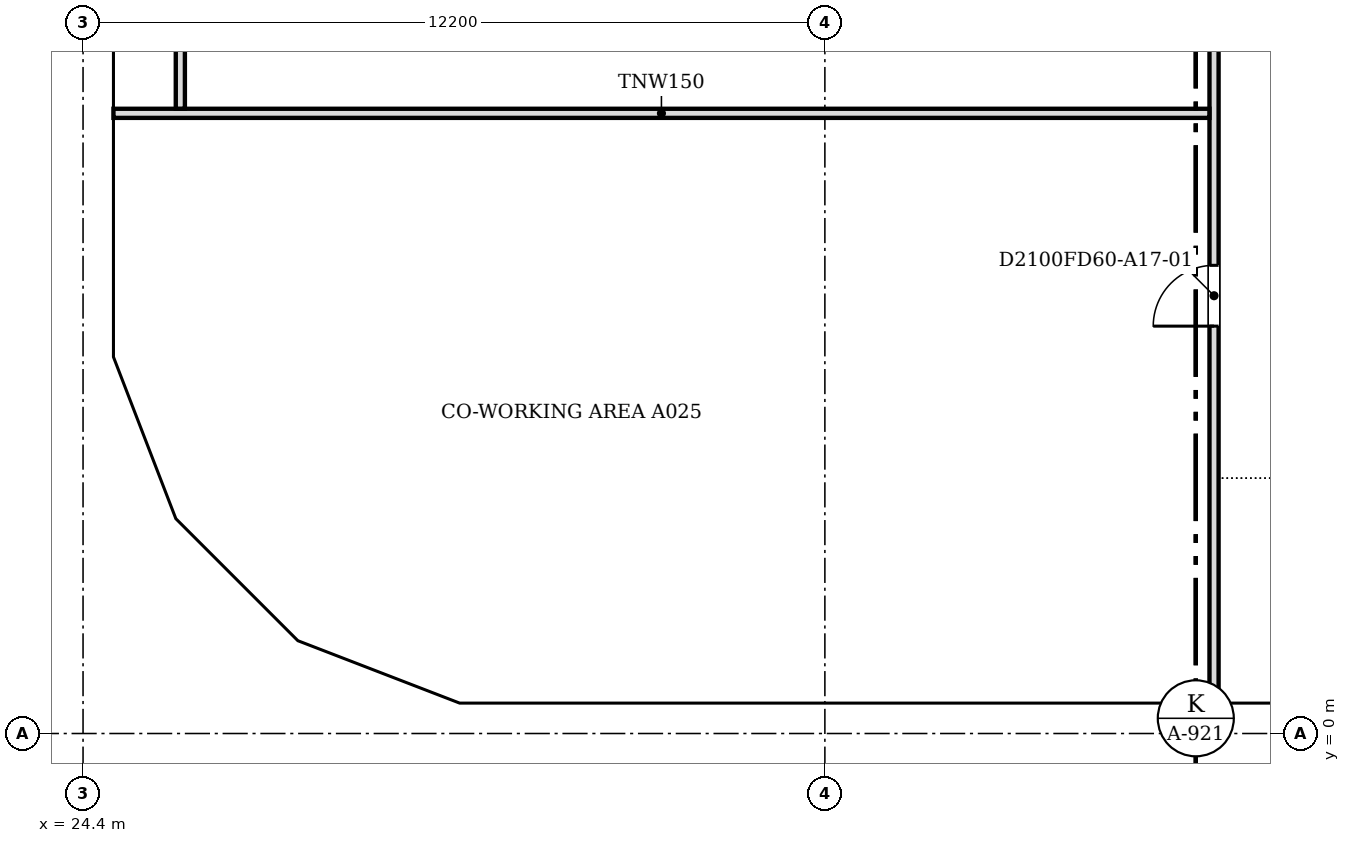
"""IFC4 building model, lengths in metres.
Left out: names, types, materials, properties, quantities, classifications, styles, units other than length and angle.
Written with IfcOpenShell. Run it as: python <this file> out.ifc"""

import sys

from ifc_helpers import new_model, si_unit, direction, frame, frame_2d, origin, place, context, subcontext, project, spatial, polyline, rectangle, outline, extrude, faceted_brep, source, transform, mapped, element, fill, save


model = new_model("IFC4")
c1 = context("Model", 3, precision=1e-05, world=origin(), true_north=direction((0.0, 1.0)))
c2 = subcontext(c1, "Body", "Model", "MODEL_VIEW")
j1 = project(units=[si_unit("LENGTHUNIT", "METRE"), si_unit("PLANEANGLEUNIT", "RADIAN")], contexts=[c1])
p1 = place(None, origin())
s1 = spatial("IfcSite", under=j1, at=p1, CompositionType="ELEMENT")
p2 = place(p1, origin())
s2 = spatial("IfcBuilding", under=s1, at=p2, CompositionType="ELEMENT")
p3 = place(p2, frame((0.0, 0.0, 185.8)))
s3 = spatial("IfcBuildingStorey", under=s2, at=p3, CompositionType="ELEMENT", Elevation=185.8)
m1 = source(origin(), c2, "Body", "Brep", [
    faceted_brep([(0.047, -0.25, 0.0), (3.05, -0.25, 3.8), (0.047, -0.25, 7.6), (0.0, -0.25, 7.54), (0.0, -0.25, 0.06), (0.093, 0.25, 7.541), (3.05, 0.25, 3.8), (0.093, 0.25, 0.059), (0.047, 0.0, 0.0), (0.047, 0.0, 7.6)], [[[0, 1, 2, 3, 4]], [[5, 6, 7]], [[7, 6, 1, 0, 8]], [[6, 5, 9, 2, 1]], [[3, 2, 9]], [[8, 0, 4]], [[7, 8, 4, 3, 9, 5]]]),
])
p4 = place(p3, frame((30.5, 0.25, -3.8), z_axis=(0.0, 0.0, 1.0), x_axis=(1.0, 0.0, 0.0)))
e1 = element("IfcWall", 1, at=p4, inside=s3, PredefinedType="SOLIDWALL", context=c2, shape_type="MappedRepresentation", body=[
    mapped(m1, transform((0.0, 0.0, 0.0), scale=1.0)),
])
m2 = source(origin(), c2, "Body", "SweptSolid", [
    extrude(outline(polyline([(0.247, 0.656), (2.731, 3.8), (0.247, 6.944), (0.247, 0.656)])), frame((0.0, 0.26, 0.0), z_axis=(0.0, -1.0, 0.0), x_axis=(1.0, 0.0, 0.0)), (0.0, 0.0, 1.0), 0.52),
])
p5 = place(p4, origin())
e2 = element("IfcOpeningElement", 2, at=p5, cuts=e1, PredefinedType="OPENING", context=c2, shape_type="MappedRepresentation", body=[
    mapped(m2, transform((0.0, 0.0, 0.0), scale=1.0)),
])
m3 = source(origin(), c2, "Body", "Brep", [
    faceted_brep([(2.95, -0.25, 0.0), (2.997, -0.25, 0.059), (2.997, -0.25, 7.541), (2.95, -0.25, 7.6), (0.0, -0.25, 3.8), (0.053, 0.25, 3.868), (2.904, 0.25, 7.54), (2.904, 0.25, 0.06), (0.053, 0.25, 3.732), (2.95, 0.0, 0.0), (2.95, 0.0, 7.6), (0.0, 0.0, 3.8)], [[[0, 1, 2, 3, 4]], [[5, 6, 7, 8]], [[1, 0, 9]], [[10, 3, 2]], [[6, 5, 11, 4, 3, 10]], [[8, 7, 9, 0, 4, 11]], [[8, 11, 5]], [[1, 9, 7, 6, 10, 2]]]),
])
p6 = place(p3, frame((27.794, 1.312, -3.8), z_axis=(0.0, 0.0, 1.0), x_axis=(0.932973525033, -0.359944998003, 0.0)))
e3 = element("IfcWall", 3, at=p6, inside=s3, PredefinedType="SOLIDWALL", context=c2, shape_type="MappedRepresentation", body=[
    mapped(m3, transform((0.0, 0.0, 0.0), scale=1.0)),
])
m4 = source(origin(), c2, "Body", "SweptSolid", [
    extrude(outline(polyline([(2.75, 6.935), (0.316, 3.8), (2.75, 0.665), (2.75, 6.935)])), frame((0.0, 0.26, 0.0), z_axis=(0.0, -1.0, 0.0), x_axis=(1.0, 0.0, 0.0)), (0.0, 0.0, 1.0), 0.52),
])
p7 = place(p6, origin())
e4 = element("IfcOpeningElement", 4, at=p7, cuts=e3, PredefinedType="OPENING", context=c2, shape_type="MappedRepresentation", body=[
    mapped(m4, transform((0.0, 0.0, 0.0), scale=1.0)),
])
m5 = source(origin(), c2, "Body", "Brep", [
    faceted_brep([(3.05, -0.25, 0.0), (6.1, -0.25, 3.8), (6.1, -0.25, 3.8), (3.05, -0.25, 7.6), (0.0, -0.25, 3.8), (0.0, 0.25, 3.8), (3.05, 0.25, 7.6), (6.1, 0.25, 3.8), (6.1, 0.25, 3.8), (3.05, 0.25, 0.0)], [[[0, 1, 2, 3, 4]], [[5, 6, 7, 8, 9]], [[9, 8, 1, 0]], [[7, 6, 3, 2]], [[6, 5, 4, 3]], [[5, 9, 0, 4]], [[1, 8, 7, 2]]]),
])
p8 = place(p3, frame((33.55, 0.25, -3.8), z_axis=(0.0, 0.0, 1.0), x_axis=(1.0, 0.0, 0.0)))
e5 = element("IfcWall", 5, at=p8, inside=s3, PredefinedType="SOLIDWALL", context=c2, shape_type="MappedRepresentation", body=[
    mapped(m5, transform((0.0, 0.0, 0.0), scale=1.0)),
])
m6 = source(origin(), c2, "Body", "SweptSolid", [
    extrude(outline(polyline([(3.05, 0.399), (5.78, 3.8), (3.05, 7.201), (0.321, 3.8), (3.05, 0.399)])), frame((0.0, 0.26, 0.0), z_axis=(0.0, -1.0, 0.0), x_axis=(1.0, 0.0, 0.0)), (0.0, 0.0, 1.0), 0.52),
])
p9 = place(p8, origin())
e6 = element("IfcOpeningElement", 6, at=p9, cuts=e5, PredefinedType="OPENING", context=c2, shape_type="MappedRepresentation", body=[
    mapped(m6, transform((0.0, 0.0, 0.0), scale=1.0)),
])
m7 = source(origin(), c2, "Body", "SweptSolid", [
    extrude(outline(polyline([(3.05, 0.0), (6.1, 3.8), (3.05, 7.6), (0.0, 3.8), (3.05, 0.0)])), frame((0.0, 0.25, 0.0), z_axis=(0.0, -1.0, 0.0), x_axis=(1.0, 0.0, 0.0)), (0.0, 0.0, 1.0), 0.5),
])
p10 = place(p3, frame((39.65, 0.25, -3.8), z_axis=(0.0, 0.0, 1.0), x_axis=(1.0, 0.0, 0.0)))
e7 = element("IfcWall", 7, at=p10, inside=s3, PredefinedType="SOLIDWALL", context=c2, shape_type="MappedRepresentation", body=[
    mapped(m7, transform((0.0, 0.0, 0.0), scale=1.0)),
])
p11 = place(p10, origin())
e8 = element("IfcOpeningElement", 8, at=p11, cuts=e7, PredefinedType="OPENING", context=c2, shape_type="MappedRepresentation", body=[
    mapped(m6, transform((0.0, 0.0, 0.0), scale=1.0)),
])
m8 = source(origin(), c2, "Body", "Brep", [
    faceted_brep([(3.096, -0.25, 0.0), (6.1, -0.25, 3.8), (3.096, -0.25, 7.6), (0.047, -0.25, 3.857), (0.047, -0.25, 3.743), (0.0, 0.25, 3.8), (3.096, 0.25, 7.6), (6.053, 0.25, 3.859), (6.053, 0.25, 3.741), (3.096, 0.25, 0.0), (6.1, -0.0, 3.8), (0.0, 0.0, 3.8)], [[[0, 1, 2, 3, 4]], [[5, 6, 7, 8, 9]], [[9, 8, 10, 1, 0]], [[7, 6, 2, 1, 10]], [[6, 5, 11, 3, 2]], [[5, 9, 0, 4, 11]], [[11, 4, 3]], [[10, 8, 7]]]),
])
p12 = place(p3, frame((24.65, 12.247, -3.8), z_axis=(0.0, 0.0, 1.0), x_axis=(0.0, -1.0, 0.0)))
e9 = element("IfcWall", 9, at=p12, inside=s3, PredefinedType="SOLIDWALL", context=c2, shape_type="MappedRepresentation", body=[
    mapped(m8, transform((0.0, 0.0, 0.0), scale=1.0)),
])
m9 = source(origin(), c2, "Body", "SweptSolid", [
    extrude(outline(polyline([(3.094, 0.399), (5.781, 3.8), (3.094, 7.201), (0.323, 3.8), (3.094, 0.399)])), frame((0.0, 0.26, 0.0), z_axis=(0.0, -1.0, 0.0), x_axis=(1.0, 0.0, 0.0)), (0.0, 0.0, 1.0), 0.52),
])
p13 = place(p12, origin())
e10 = element("IfcOpeningElement", 10, at=p13, cuts=e9, PredefinedType="OPENING", context=c2, shape_type="MappedRepresentation", body=[
    mapped(m9, transform((0.0, 0.0, 0.0), scale=1.0)),
])
m10 = source(origin(), c2, "Body", "Brep", [
    faceted_brep([(2.95, -0.25, 0.0), (3.003, -0.25, 0.068), (3.003, -0.25, 7.532), (2.95, -0.25, 7.6), (0.0, -0.25, 3.8), (0.047, 0.25, 3.86), (2.898, 0.25, 7.532), (2.898, 0.25, 0.068), (0.047, 0.25, 3.74), (2.95, 0.0, 0.0), (2.95, 0.0, 7.6), (0.0, 0.0, 3.8)], [[[0, 1, 2, 3, 4]], [[5, 6, 7, 8]], [[1, 0, 9]], [[10, 3, 2]], [[6, 5, 11, 4, 3, 10]], [[8, 7, 9, 0, 4, 11]], [[8, 11, 5]], [[1, 9, 7, 6, 10, 2]]]),
])
p14 = place(p3, frame((24.65, 6.146, -3.8), z_axis=(0.0, 0.0, 1.0), x_axis=(0.359953949349, -0.932970071518, 0.0)))
e11 = element("IfcWall", 11, at=p14, inside=s3, PredefinedType="SOLIDWALL", context=c2, shape_type="MappedRepresentation", body=[
    mapped(m10, transform((0.0, 0.0, 0.0), scale=1.0)),
])
p15 = place(p14, origin())
e12 = element("IfcOpeningElement", 12, at=p15, cuts=e11, PredefinedType="OPENING", context=c2, shape_type="MappedRepresentation", body=[
    mapped(m4, transform((0.0, 0.0, 0.0), scale=1.0)),
])
m11 = source(origin(), c2, "Body", "Brep", [
    faceted_brep([(0.053, -0.25, 0.0), (2.997, -0.25, 3.8), (0.053, -0.25, 7.6), (0.0, -0.25, 7.532), (0.0, -0.25, 0.068), (0.106, 0.25, 7.532), (2.944, 0.25, 3.868), (2.944, 0.25, 3.732), (0.106, 0.25, 0.068), (2.997, 0.0, 3.8), (0.053, 0.0, 0.0), (0.053, 0.0, 7.6)], [[[0, 1, 2, 3, 4]], [[5, 6, 7, 8]], [[8, 7, 9, 1, 0, 10]], [[6, 5, 11, 2, 1, 9]], [[3, 2, 11]], [[10, 0, 4]], [[8, 10, 4, 3, 11, 5]], [[9, 7, 6]]]),
])
p16 = place(p3, frame((25.675, 3.431, -3.8), z_axis=(0.0, 0.0, 1.0), x_axis=(0.707106781187, -0.707106781187, 0.0)))
e13 = element("IfcWall", 13, at=p16, inside=s3, PredefinedType="SOLIDWALL", context=c2, shape_type="MappedRepresentation", body=[
    mapped(m11, transform((0.0, 0.0, 0.0), scale=1.0)),
])
m12 = source(origin(), c2, "Body", "SweptSolid", [
    extrude(outline(polyline([(0.253, 0.666), (2.681, 3.8), (0.253, 6.934), (0.253, 0.666)])), frame((0.0, 0.26, 0.0), z_axis=(0.0, -1.0, 0.0), x_axis=(1.0, 0.0, 0.0)), (0.0, 0.0, 1.0), 0.52),
])
p17 = place(p16, origin())
e14 = element("IfcOpeningElement", 14, at=p17, cuts=e13, PredefinedType="OPENING", context=c2, shape_type="MappedRepresentation", body=[
    mapped(m12, transform((0.0, 0.0, 0.0), scale=1.0)),
])
p18 = place(p2, frame((0.0, 0.0, 189.6)))
s4 = spatial("IfcBuildingStorey", under=s2, at=p18, CompositionType="ELEMENT", Elevation=189.6)
m13 = source(origin(), c2, "Body", "Brep", [
    faceted_brep([(3.003, -0.25, 0.0), (6.053, -0.25, 3.8), (3.003, -0.25, 7.6), (0.0, -0.25, 3.8), (0.047, 0.25, 3.859), (3.003, 0.25, 7.6), (6.053, 0.25, 3.8), (3.003, 0.25, 0.0), (0.047, 0.25, 3.741), (0.0, 0.0, 3.8)], [[[0, 1, 2, 3]], [[4, 5, 6, 7, 8]], [[7, 6, 1, 0]], [[6, 5, 2, 1]], [[5, 4, 9, 3, 2]], [[8, 7, 0, 3, 9]], [[8, 9, 4]]]),
])
p19 = place(p18, frame((30.547, 0.25, -3.8), z_axis=(0.0, 0.0, 1.0), x_axis=(1.0, 0.0, 0.0)))
e15 = element("IfcWall", 15, at=p19, inside=s4, PredefinedType="SOLIDWALL", context=c2, shape_type="MappedRepresentation", body=[
    mapped(m13, transform((0.0, 0.0, 0.0), scale=1.0)),
])
m14 = source(origin(), c2, "Body", "SweptSolid", [
    extrude(outline(polyline([(3.005, 0.401), (5.733, 3.8), (3.005, 7.199), (0.319, 3.8), (3.005, 0.401)])), frame((0.0, 0.26, 0.0), z_axis=(0.0, -1.0, 0.0), x_axis=(1.0, 0.0, 0.0)), (0.0, 0.0, 1.0), 0.52),
])
p20 = place(p19, origin())
e16 = element("IfcOpeningElement", 16, at=p20, cuts=e15, PredefinedType="OPENING", context=c2, shape_type="MappedRepresentation", body=[
    mapped(m14, transform((0.0, 0.0, 0.0), scale=1.0)),
])
m15 = source(origin(), c2, "Body", "Brep", [
    faceted_brep([(3.05, -0.25, 0.0), (6.1, -0.25, 3.8), (6.1, -0.25, 3.8), (3.05, -0.25, 7.6), (0.0, -0.25, 3.8), (0.0, 0.25, 3.8), (3.05, 0.25, 7.6), (6.1, 0.25, 3.8), (6.1, 0.25, 3.8), (3.05, 0.25, 0.0)], [[[0, 1, 2, 3, 4]], [[5, 6, 7, 8, 9]], [[9, 8, 1, 0]], [[7, 6, 3, 2]], [[6, 5, 4, 3]], [[5, 9, 0, 4]], [[1, 8, 7, 2]]]),
])
p21 = place(p18, frame((36.6, 0.25, -3.8), z_axis=(0.0, 0.0, 1.0), x_axis=(1.0, 0.0, 0.0)))
e17 = element("IfcWall", 17, at=p21, inside=s4, PredefinedType="SOLIDWALL", context=c2, shape_type="MappedRepresentation", body=[
    mapped(m15, transform((0.0, 0.0, 0.0), scale=1.0)),
])
m16 = source(origin(), c2, "Body", "SweptSolid", [
    extrude(outline(polyline([(3.05, 0.399), (5.78, 3.8), (3.05, 7.2), (0.321, 3.8), (3.05, 0.399)])), frame((0.0, 0.26, 0.0), z_axis=(0.0, -1.0, 0.0), x_axis=(1.0, 0.0, 0.0)), (0.0, 0.0, 1.0), 0.52),
])
p22 = place(p21, origin())
e18 = element("IfcOpeningElement", 18, at=p22, cuts=e17, PredefinedType="OPENING", context=c2, shape_type="MappedRepresentation", body=[
    mapped(m16, transform((0.0, 0.0, 0.0), scale=1.0)),
])
m17 = source(origin(), c2, "Body", "SweptSolid", [
    extrude(outline(polyline([(3.05, 0.0), (6.1, 3.8), (3.05, 7.6), (0.0, 3.8), (3.05, 0.0)])), frame((0.0, 0.25, 0.0), z_axis=(0.0, -1.0, 0.0), x_axis=(1.0, 0.0, 0.0)), (0.0, 0.0, 1.0), 0.5),
])
p23 = place(p18, frame((42.7, 0.25, -3.8), z_axis=(0.0, 0.0, 1.0), x_axis=(1.0, 0.0, 0.0)))
e19 = element("IfcWall", 19, at=p23, inside=s4, PredefinedType="SOLIDWALL", context=c2, shape_type="MappedRepresentation", body=[
    mapped(m17, transform((0.0, 0.0, 0.0), scale=1.0)),
])
p24 = place(p23, origin())
e20 = element("IfcOpeningElement", 20, at=p24, cuts=e19, PredefinedType="OPENING", context=c2, shape_type="MappedRepresentation", body=[
    mapped(m16, transform((0.0, 0.0, 0.0), scale=1.0)),
])
m18 = source(origin(), c2, "Body", "Brep", [
    faceted_brep([(0.093, -0.25, 0.057), (3.143, -0.25, 3.8), (0.093, -0.25, 7.543), (0.0, 0.25, 7.544), (0.047, 0.25, 7.6), (3.143, 0.25, 3.8), (0.047, 0.25, 0.0), (0.0, 0.25, 0.056), (0.047, 0.0, 0.0), (0.047, 0.0, 7.6)], [[[0, 1, 2]], [[3, 4, 5, 6, 7]], [[6, 5, 1, 0, 8]], [[5, 4, 9, 2, 1]], [[4, 3, 9]], [[7, 6, 8]], [[7, 8, 0, 2, 9, 3]]]),
])
p25 = place(p18, frame((24.65, 12.293, -3.8), z_axis=(0.0, 0.0, 1.0), x_axis=(0.0, -1.0, 0.0)))
e21 = element("IfcWall", 21, at=p25, inside=s4, PredefinedType="SOLIDWALL", context=c2, shape_type="MappedRepresentation", body=[
    mapped(m18, transform((0.0, 0.0, 0.0), scale=1.0)),
])
m19 = source(origin(), c2, "Body", "SweptSolid", [
    extrude(outline(polyline([(0.247, 0.641), (2.821, 3.8), (0.247, 6.959), (0.247, 0.641)])), frame((0.0, 0.26, 0.0), z_axis=(0.0, -1.0, 0.0), x_axis=(1.0, 0.0, 0.0)), (0.0, 0.0, 1.0), 0.52),
])
p26 = place(p25, origin())
e22 = element("IfcOpeningElement", 22, at=p26, cuts=e21, PredefinedType="OPENING", context=c2, shape_type="MappedRepresentation", body=[
    mapped(m19, transform((0.0, 0.0, 0.0), scale=1.0)),
])
m20 = source(origin(), c2, "Body", "Brep", [
    faceted_brep([(3.003, -0.25, 0.0), (3.05, -0.25, 0.06), (3.05, -0.25, 7.54), (3.003, -0.25, 7.6), (0.0, -0.25, 3.8), (0.0, 0.25, 3.8), (2.957, 0.25, 7.541), (2.957, 0.25, 0.059), (3.003, 0.0, 0.0), (3.003, 0.0, 7.6)], [[[0, 1, 2, 3, 4]], [[5, 6, 7]], [[1, 0, 8]], [[9, 3, 2]], [[6, 5, 4, 3, 9]], [[5, 7, 8, 0, 4]], [[1, 8, 7, 6, 9, 2]]]),
])
p27 = place(p18, frame((24.65, 9.15, -3.8), z_axis=(0.0, 0.0, 1.0), x_axis=(0.0, -1.0, 0.0)))
e23 = element("IfcWall", 23, at=p27, inside=s4, PredefinedType="SOLIDWALL", context=c2, shape_type="MappedRepresentation", body=[
    mapped(m20, transform((0.0, 0.0, 0.0), scale=1.0)),
])
m21 = source(origin(), c2, "Body", "SweptSolid", [
    extrude(outline(polyline([(2.803, 6.944), (0.319, 3.8), (2.803, 0.656), (2.803, 6.944)])), frame((0.0, 0.26, 0.0), z_axis=(0.0, -1.0, 0.0), x_axis=(1.0, 0.0, 0.0)), (0.0, 0.0, 1.0), 0.52),
])
p28 = place(p27, origin())
e24 = element("IfcOpeningElement", 24, at=p28, cuts=e23, PredefinedType="OPENING", context=c2, shape_type="MappedRepresentation", body=[
    mapped(m21, transform((0.0, 0.0, 0.0), scale=1.0)),
])
m22 = source(origin(), c2, "Body", "Brep", [
    faceted_brep([(0.047, -0.25, 0.0), (2.997, -0.25, 3.8), (0.047, -0.25, 7.6), (0.0, -0.25, 7.541), (0.0, -0.25, 0.059), (0.093, 0.25, 7.54), (2.944, 0.25, 3.868), (2.944, 0.25, 3.732), (0.093, 0.25, 0.06), (2.997, 0.0, 3.8), (0.047, 0.0, 0.0), (0.047, 0.0, 7.6)], [[[0, 1, 2, 3, 4]], [[5, 6, 7, 8]], [[8, 7, 9, 1, 0, 10]], [[6, 5, 11, 2, 1, 9]], [[3, 2, 11]], [[10, 0, 4]], [[8, 10, 4, 3, 11, 5]], [[7, 6, 9]]]),
])
p29 = place(p18, frame((24.633, 6.19, -3.8), z_axis=(0.0, 0.0, 1.0), x_axis=(0.359901446078, -0.932990326376, 0.0)))
e25 = element("IfcWall", 25, at=p29, inside=s4, PredefinedType="SOLIDWALL", context=c2, shape_type="MappedRepresentation", body=[
    mapped(m22, transform((0.0, 0.0, 0.0), scale=1.0)),
])
m23 = source(origin(), c2, "Body", "SweptSolid", [
    extrude(outline(polyline([(0.247, 0.665), (2.681, 3.8), (0.247, 6.935), (0.247, 0.665)])), frame((0.0, 0.26, 0.0), z_axis=(0.0, -1.0, 0.0), x_axis=(1.0, 0.0, 0.0)), (0.0, 0.0, 1.0), 0.52),
])
p30 = place(p29, origin())
e26 = element("IfcOpeningElement", 26, at=p30, cuts=e25, PredefinedType="OPENING", context=c2, shape_type="MappedRepresentation", body=[
    mapped(m23, transform((0.0, 0.0, 0.0), scale=1.0)),
])
m24 = source(origin(), c2, "Body", "Brep", [
    faceted_brep([(2.944, -0.25, 0.0), (2.997, -0.25, 0.068), (2.997, -0.25, 7.532), (2.944, -0.25, 7.6), (0.0, -0.25, 3.8), (0.053, 0.25, 3.868), (2.891, 0.25, 7.532), (2.891, 0.25, 0.068), (0.053, 0.25, 3.732), (2.944, 0.0, 0.0), (2.944, 0.0, 7.6), (0.0, 0.0, 3.8)], [[[0, 1, 2, 3, 4]], [[5, 6, 7, 8]], [[1, 0, 9]], [[10, 3, 2]], [[6, 5, 11, 4, 3, 10]], [[8, 7, 9, 0, 4, 11]], [[8, 11, 5]], [[1, 9, 7, 6, 10, 2]]]),
])
p31 = place(p18, frame((25.712, 3.394, -3.8), z_axis=(0.0, 0.0, 1.0), x_axis=(0.707066050402, -0.707147509625, 0.0)))
e27 = element("IfcWall", 27, at=p31, inside=s4, PredefinedType="SOLIDWALL", context=c2, shape_type="MappedRepresentation", body=[
    mapped(m24, transform((0.0, 0.0, 0.0), scale=1.0)),
])
m25 = source(origin(), c2, "Body", "SweptSolid", [
    extrude(outline(polyline([(2.744, 6.934), (0.316, 3.8), (2.744, 0.666), (2.744, 6.934)])), frame((0.0, 0.26, 0.0), z_axis=(0.0, -1.0, 0.0), x_axis=(1.0, 0.0, 0.0)), (0.0, 0.0, 1.0), 0.52),
])
p32 = place(p31, origin())
e28 = element("IfcOpeningElement", 28, at=p32, cuts=e27, PredefinedType="OPENING", context=c2, shape_type="MappedRepresentation", body=[
    mapped(m25, transform((0.0, 0.0, 0.0), scale=1.0)),
])
m26 = source(origin(), c2, "Body", "Brep", [
    faceted_brep([(0.053, -0.25, 0.0), (3.003, -0.25, 3.8), (0.053, -0.25, 7.6), (0.0, -0.25, 7.531), (0.0, -0.25, 0.068), (0.106, 0.25, 7.532), (2.957, 0.25, 3.86), (2.957, 0.25, 3.74), (0.106, 0.25, 0.068), (3.003, 0.0, 3.8), (0.053, 0.0, 0.0), (0.053, 0.0, 7.6)], [[[0, 1, 2, 3, 4]], [[5, 6, 7, 8]], [[8, 7, 9, 1, 0, 10]], [[6, 5, 11, 2, 1, 9]], [[3, 2, 11]], [[10, 0, 4]], [[8, 10, 4, 3, 11, 5]], [[7, 6, 9]]]),
])
p33 = place(p18, frame((27.744, 1.331, -3.8), z_axis=(0.0, 0.0, 1.0), x_axis=(0.932970071518, -0.359953949349, 0.0)))
e29 = element("IfcWall", 29, at=p33, inside=s4, PredefinedType="SOLIDWALL", context=c2, shape_type="MappedRepresentation", body=[
    mapped(m26, transform((0.0, 0.0, 0.0), scale=1.0)),
])
m27 = source(origin(), c2, "Body", "SweptSolid", [
    extrude(outline(polyline([(0.253, 0.665), (2.687, 3.8), (0.253, 6.935), (0.253, 0.665)])), frame((0.0, 0.26, 0.0), z_axis=(0.0, -1.0, 0.0), x_axis=(1.0, 0.0, 0.0)), (0.0, 0.0, 1.0), 0.52),
])
p34 = place(p33, origin())
e30 = element("IfcOpeningElement", 30, at=p34, cuts=e29, PredefinedType="OPENING", context=c2, shape_type="MappedRepresentation", body=[
    mapped(m27, transform((0.0, 0.0, 0.0), scale=1.0)),
])
p35 = place(p3, frame((43.0, 0.5, 0.0), z_axis=(0.0, 0.0, 1.0), x_axis=(0.0, 1.0, 0.0)))
e31 = element("IfcWall", 31, at=p35, inside=s3, PredefinedType="PARTITIONING", context=c2, shape_type="SweptSolid", body=[
    extrude(rectangle(XDim=21.424, YDim=0.15, at=frame_2d((10.712, 0.0))), origin(), (0.0, 0.0, 1.0), 3.067),
])
m28 = source(origin(), c2, "Body", "SweptSolid", [
    extrude(rectangle(XDim=1.0, YDim=2.1, at=frame_2d((0.5, 1.05))), frame((0.0, 0.085, 0.0), z_axis=(0.0, -1.0, 0.0), x_axis=(1.0, 0.0, 0.0)), (0.0, 0.0, 1.0), 0.17),
])
p36 = place(p35, frame((6.2, 0.0, 0.0)))
e32 = element("IfcOpeningElement", 32, at=p36, cuts=e31, PredefinedType="OPENING", context=c2, shape_type="MappedRepresentation", body=[
    mapped(m28, transform((0.0, 0.0, 0.0), scale=1.0)),
])
p37 = place(p35, frame((15.1, 0.0, 0.0)))
e33 = element("IfcOpeningElement", 33, at=p37, cuts=e31, PredefinedType="OPENING", context=c2, shape_type="MappedRepresentation", body=[
    mapped(m28, transform((0.0, 0.0, 0.0), scale=1.0)),
])
p38 = place(p3, frame((24.9, 10.2, 0.0), z_axis=(0.0, 0.0, 1.0), x_axis=(1.0, 0.0, 0.0)))
e34 = element("IfcWall", 34, at=p38, inside=s3, PredefinedType="PARTITIONING", context=c2, shape_type="SweptSolid", body=[
    extrude(rectangle(XDim=18.024, YDim=0.15, at=frame_2d((9.012, 0.0))), origin(), (0.0, 0.0, 1.0), 3.067),
])
p39 = place(p3, frame((26.0, 10.276, 0.0), z_axis=(0.0, 0.0, 1.0), x_axis=(0.0, 1.0, 0.0)))
e35 = element("IfcWall", 35, at=p39, inside=s3, PredefinedType="PARTITIONING", context=c2, shape_type="SweptSolid", body=[
    extrude(rectangle(XDim=8.524, YDim=0.15, at=frame_2d((4.262, 0.0))), origin(), (0.0, 0.0, 1.0), 3.067),
])
m29 = source(origin(), c2, "Body", "SweptSolid", [
    extrude(rectangle(XDim=0.9, YDim=2.1, at=frame_2d((0.45, 1.05))), frame((0.0, 0.085, 0.0), z_axis=(0.0, -1.0, 0.0), x_axis=(1.0, 0.0, 0.0)), (0.0, 0.0, 1.0), 0.17),
])
p40 = place(p39, frame((1.6, 0.0, 0.0)))
e36 = element("IfcOpeningElement", 36, at=p40, cuts=e35, PredefinedType="OPENING", context=c2, shape_type="MappedRepresentation", body=[
    mapped(m29, transform((0.0, 0.0, 0.0), scale=1.0)),
])
p41 = place(p39, frame((5.879, 0.0, 0.0)))
e37 = element("IfcOpeningElement", 37, at=p41, cuts=e35, PredefinedType="OPENING", context=c2, shape_type="MappedRepresentation", body=[
    mapped(m29, transform((0.0, 0.0, 0.0), scale=1.0)),
])
m30 = source(origin(), c2, "Body", "SweptSolid", [
    extrude(rectangle(XDim=1.0, YDim=2.1, at=frame_2d((0.5, 1.05))), frame((0.0, 0.025, 0.0), z_axis=(0.0, -1.0, 0.0), x_axis=(1.0, 0.0, 0.0)), (0.0, 0.0, 1.0), 0.05),
])
p42 = place(p36, origin())
e38 = element("IfcDoor", 38, at=p42, inside=s3, OperationType="SINGLE_SWING_LEFT", PredefinedType="DOOR", context=c2, shape_type="MappedRepresentation", body=[
    mapped(m30, transform((0.0, 0.0, 0.0), scale=1.0)),
])
fill(e32, e38)
save(model, sys.argv[1])
